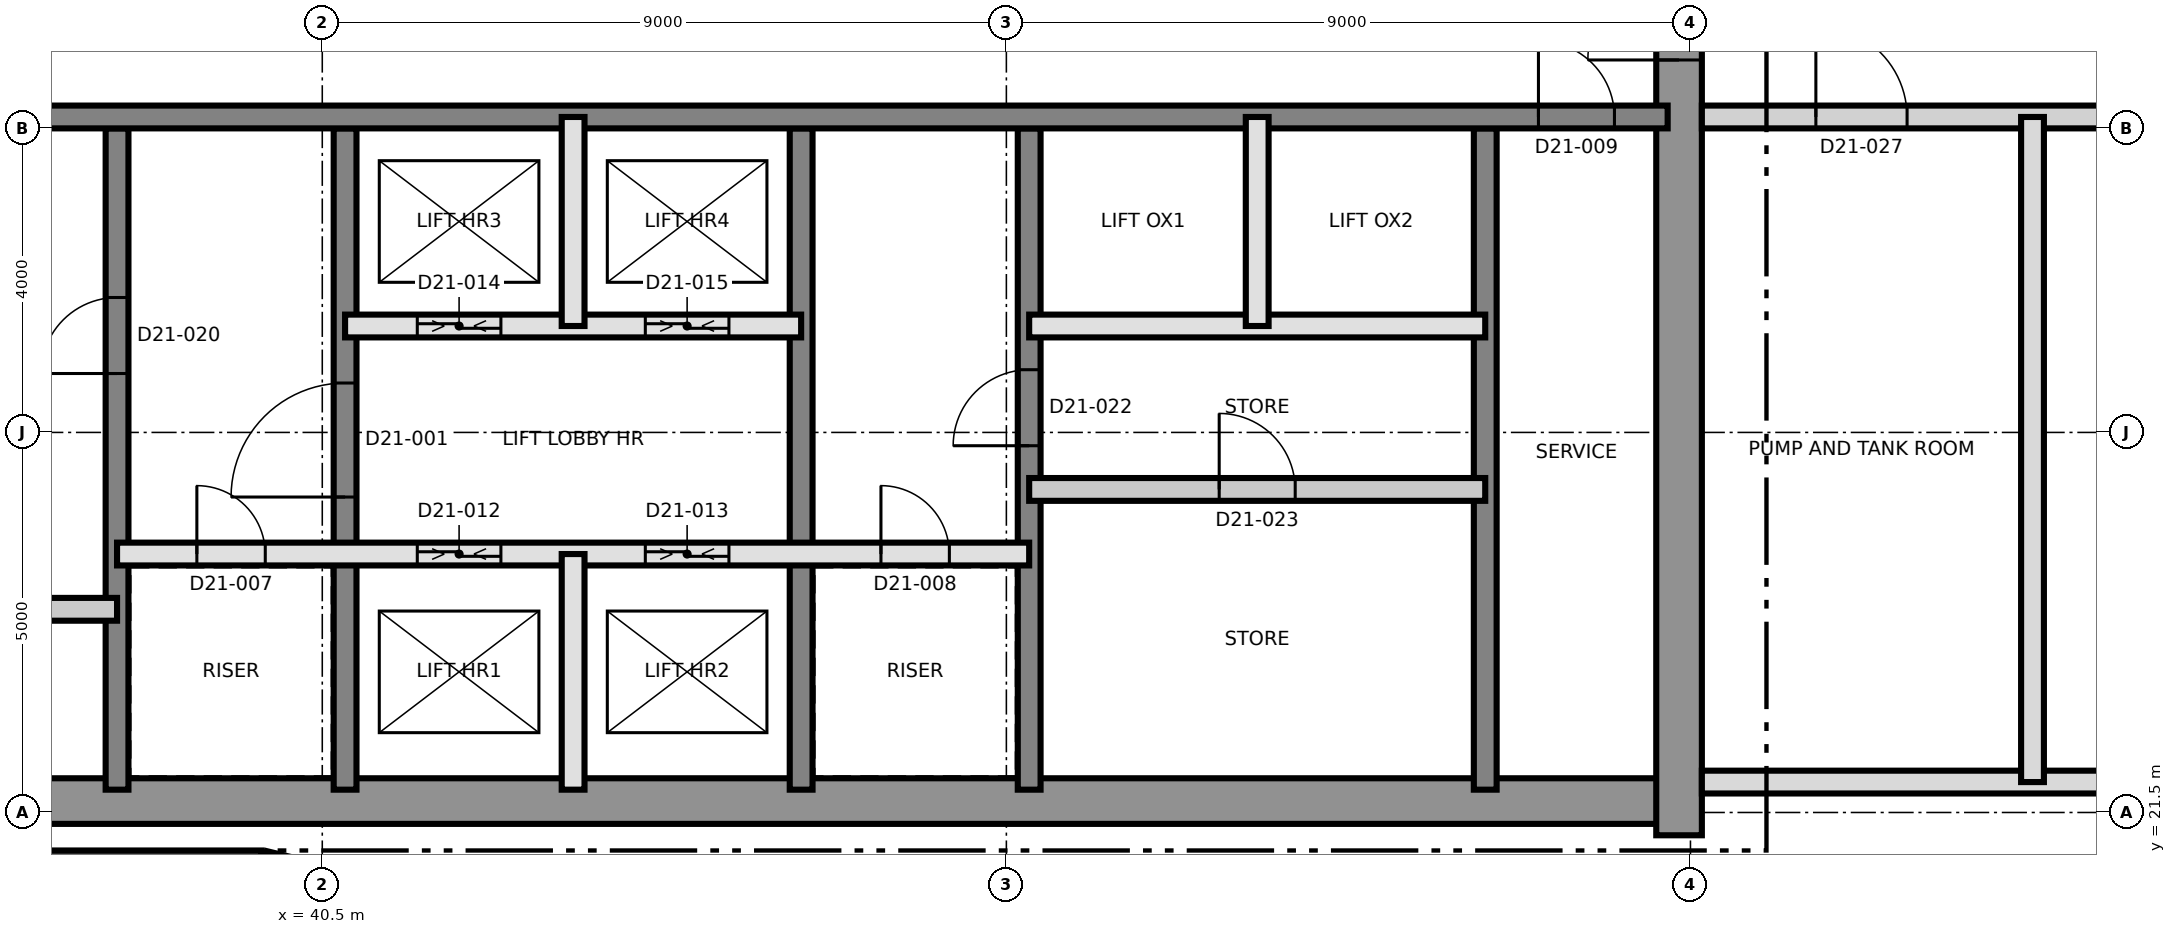
"""IFC4 building model, lengths in metres.
Left out: names, types, materials, properties, quantities, classifications, styles, units other than length and angle.
Written with IfcOpenShell. Run it as: python <this file> out.ifc"""

import sys

from ifc_helpers import new_model, si_unit, direction, frame, frame_2d, origin, place, context, subcontext, project, spatial, rectangle, extrude, element, fill, save


model = new_model("IFC4")
c1 = context("Model", 3, precision=1e-05, world=origin(), true_north=direction((0.0, 1.0)))
c2 = subcontext(c1, "Body", "Model", "MODEL_VIEW")
j1 = project(units=[si_unit("LENGTHUNIT", "METRE"), si_unit("PLANEANGLEUNIT", "RADIAN")], contexts=[c1])
p1 = place(None, origin())
s1 = spatial("IfcSite", under=j1, at=p1, CompositionType="ELEMENT")
p2 = place(p1, origin())
s2 = spatial("IfcBuilding", under=s1, at=p2, CompositionType="ELEMENT")
p3 = place(p2, frame((0.0, 0.0, 190.3)))
s3 = spatial("IfcBuildingStorey", under=s2, at=p3, CompositionType="ELEMENT", Elevation=190.3)
p4 = place(p3, frame((31.2, 21.65, 0.0), z_axis=(0.0, 0.0, 1.0), x_axis=(1.0, 0.0, 0.0)))
e1 = element("IfcWall", 1, at=p4, inside=s3, PredefinedType="SHEAR", context=c2, shape_type="SweptSolid", body=[
    extrude(rectangle(XDim=27.0, YDim=0.6, at=frame_2d((13.5, 0.0))), origin(), (0.0, 0.0, 1.0), 5.5),
])
p5 = place(p3, frame((58.35, 21.2, 0.0), z_axis=(0.0, 0.0, 1.0), x_axis=(0.0, 1.0, 0.0)))
e2 = element("IfcWall", 2, at=p5, inside=s3, PredefinedType="SHEAR", context=c2, shape_type="SweptSolid", body=[
    extrude(rectangle(XDim=18.6, YDim=0.6, at=frame_2d((9.3, 0.0))), origin(), (0.0, 0.0, 1.0), 5.5),
])
p6 = place(p5, frame((10.2, 0.0, 0.0)))
e3 = element("IfcOpeningElement", 3, at=p6, cuts=e2, PredefinedType="OPENING", context=c2, shape_type="SweptSolid", body=[
    extrude(rectangle(XDim=1.2, YDim=2.1, at=frame_2d((0.6, 1.05))), frame((0.0, 0.31, 0.0), z_axis=(0.0, -1.0, 0.0), x_axis=(1.0, 0.0, 0.0)), (0.0, 0.0, 1.0), 0.62),
])
p7 = place(p3, frame((37.8, 21.8, 0.0), z_axis=(0.0, 0.0, 1.0), x_axis=(0.0, 1.0, 0.0)))
e4 = element("IfcWall", 4, at=p7, inside=s3, PredefinedType="SHEAR", context=c2, shape_type="SweptSolid", body=[
    extrude(rectangle(XDim=8.7, YDim=0.3, at=frame_2d((4.35, 0.0))), origin(), (0.0, 0.0, 1.0), 5.5),
])
p8 = place(p7, frame((5.475, 0.0, 0.0)))
e5 = element("IfcOpeningElement", 5, at=p8, cuts=e4, PredefinedType="OPENING", context=c2, shape_type="SweptSolid", body=[
    extrude(rectangle(XDim=1.0, YDim=2.1, at=frame_2d((0.5, 1.05))), frame((0.0, 0.16, 0.0), z_axis=(0.0, -1.0, 0.0), x_axis=(1.0, 0.0, 0.0)), (0.0, 0.0, 1.0), 0.32),
])
p9 = place(p3, frame((40.8, 21.8, 0.0), z_axis=(0.0, 0.0, 1.0), x_axis=(0.0, 1.0, 0.0)))
e6 = element("IfcWall", 6, at=p9, inside=s3, PredefinedType="SHEAR", context=c2, shape_type="SweptSolid", body=[
    extrude(rectangle(XDim=8.7, YDim=0.3, at=frame_2d((4.35, 0.0))), origin(), (0.0, 0.0, 1.0), 5.5),
])
p10 = place(p9, frame((3.85, 0.0, 0.0)))
e7 = element("IfcOpeningElement", 7, at=p10, cuts=e6, PredefinedType="OPENING", context=c2, shape_type="SweptSolid", body=[
    extrude(rectangle(XDim=1.5, YDim=2.1, at=frame_2d((0.75, 1.05))), frame((0.0, 0.16, 0.0), z_axis=(0.0, -1.0, 0.0), x_axis=(1.0, 0.0, 0.0)), (0.0, 0.0, 1.0), 0.32),
])
p11 = place(p3, frame((46.8, 21.8, 0.0), z_axis=(0.0, 0.0, 1.0), x_axis=(0.0, 1.0, 0.0)))
e8 = element("IfcWall", 8, at=p11, inside=s3, PredefinedType="SHEAR", context=c2, shape_type="SweptSolid", body=[
    extrude(rectangle(XDim=8.7, YDim=0.3, at=frame_2d((4.35, 0.0))), origin(), (0.0, 0.0, 1.0), 5.5),
])
p12 = place(p3, frame((49.8, 21.8, 0.0), z_axis=(0.0, 0.0, 1.0), x_axis=(0.0, 1.0, 0.0)))
e9 = element("IfcWall", 9, at=p12, inside=s3, PredefinedType="SHEAR", context=c2, shape_type="SweptSolid", body=[
    extrude(rectangle(XDim=8.7, YDim=0.3, at=frame_2d((4.35, 0.0))), origin(), (0.0, 0.0, 1.0), 5.5),
])
p13 = place(p12, frame((4.525, 0.0, 0.0)))
e10 = element("IfcOpeningElement", 10, at=p13, cuts=e9, PredefinedType="OPENING", context=c2, shape_type="SweptSolid", body=[
    extrude(rectangle(XDim=1.0, YDim=2.1, at=frame_2d((0.5, 1.05))), frame((0.0, 0.16, 0.0), z_axis=(0.0, -1.0, 0.0), x_axis=(1.0, 0.0, 0.0)), (0.0, 0.0, 1.0), 0.32),
])
p14 = place(p3, frame((55.8, 21.8, 0.0), z_axis=(0.0, 0.0, 1.0), x_axis=(0.0, 1.0, 0.0)))
e11 = element("IfcWall", 11, at=p14, inside=s3, PredefinedType="SHEAR", context=c2, shape_type="SweptSolid", body=[
    extrude(rectangle(XDim=8.7, YDim=0.3, at=frame_2d((4.35, 0.0))), origin(), (0.0, 0.0, 1.0), 5.5),
])
p15 = place(p3, frame((31.8, 30.65, 0.0), z_axis=(0.0, 0.0, 1.0), x_axis=(1.0, 0.0, 0.0)))
e12 = element("IfcWall", 12, at=p15, inside=s3, PredefinedType="SHEAR", context=c2, shape_type="SweptSolid", body=[
    extrude(rectangle(XDim=26.4, YDim=0.3, at=frame_2d((13.2, 0.0))), origin(), (0.0, 0.0, 1.0), 5.5),
])
p16 = place(p15, frame((24.7, 0.0, 0.0)))
e13 = element("IfcOpeningElement", 13, at=p16, cuts=e12, PredefinedType="OPENING", context=c2, shape_type="SweptSolid", body=[
    extrude(rectangle(XDim=1.0, YDim=2.1, at=frame_2d((0.5, 1.05))), frame((0.0, 0.16, 0.0), z_axis=(0.0, -1.0, 0.0), x_axis=(1.0, 0.0, 0.0)), (0.0, 0.0, 1.0), 0.32),
])
p17 = place(p3, frame((31.36, 20.85, 0.0), z_axis=(0.0, 0.0, 1.0), x_axis=(1.0, 0.0, 0.0)))
e14 = element("IfcWall", 14, at=p17, inside=s3, PredefinedType="SOLIDWALL", context=c2, shape_type="SweptSolid", body=[
    extrude(rectangle(XDim=8.34, YDim=0.3, at=frame_2d((4.17, 0.0))), origin(), (0.0, 0.0, 1.0), 5.2),
])
p18 = place(p3, frame((39.735, 20.846, 0.0), z_axis=(0.0, 0.0, 1.0), x_axis=(0.97206095595, -0.234728562212, 0.0)))
e15 = element("IfcWall", 15, at=p18, inside=s3, PredefinedType="SOLIDWALL", context=c2, shape_type="SweptSolid", body=[
    extrude(rectangle(XDim=2.35, YDim=0.3, at=frame_2d((1.175, 0.0))), origin(), (0.0, 0.0, 1.0), 5.2),
])
p19 = place(p3, frame((31.8, 24.173, 0.0), z_axis=(0.0, 0.0, 1.0), x_axis=(1.0, 0.0, 0.0)))
e16 = element("IfcWall", 16, at=p19, inside=s3, PredefinedType="PARTITIONING", context=c2, shape_type="SweptSolid", body=[
    extrude(rectangle(XDim=6.0, YDim=0.3, at=frame_2d((3.0, 0.0))), origin(), (0.0, 0.0, 1.0), 5.2),
])
p20 = place(p19, frame((2.5, 0.0, 0.0)))
e17 = element("IfcOpeningElement", 17, at=p20, cuts=e16, PredefinedType="OPENING", context=c2, shape_type="SweptSolid", body=[
    extrude(rectangle(XDim=1.0, YDim=2.1, at=frame_2d((0.5, 1.05))), frame((0.0, 0.16, 0.0), z_axis=(0.0, -1.0, 0.0), x_axis=(1.0, 0.0, 0.0)), (0.0, 0.0, 1.0), 0.32),
])
p21 = place(p3, frame((37.8, 24.9, 0.0), z_axis=(0.0, 0.0, 1.0), x_axis=(1.0, 0.0, 0.0)))
e18 = element("IfcWall", 18, at=p21, inside=s3, PredefinedType="SOLIDWALL", context=c2, shape_type="SweptSolid", body=[
    extrude(rectangle(XDim=12.0, YDim=0.3, at=frame_2d((6.0, 0.0))), origin(), (0.0, 0.0, 1.0), 5.2),
])
p22 = place(p21, frame((1.05, 0.0, 0.0)))
e19 = element("IfcOpeningElement", 19, at=p22, cuts=e18, PredefinedType="OPENING", context=c2, shape_type="SweptSolid", body=[
    extrude(rectangle(XDim=0.9, YDim=2.1, at=frame_2d((0.45, 1.05))), frame((0.0, 0.16, 0.0), z_axis=(0.0, -1.0, 0.0), x_axis=(1.0, 0.0, 0.0)), (0.0, 0.0, 1.0), 0.32),
])
p23 = place(p21, frame((10.05, 0.0, 0.0)))
e20 = element("IfcOpeningElement", 20, at=p23, cuts=e18, PredefinedType="OPENING", context=c2, shape_type="SweptSolid", body=[
    extrude(rectangle(XDim=0.9, YDim=2.1, at=frame_2d((0.45, 1.05))), frame((0.0, 0.16, 0.0), z_axis=(0.0, -1.0, 0.0), x_axis=(1.0, 0.0, 0.0)), (0.0, 0.0, 1.0), 0.32),
])
p24 = place(p21, frame((3.95, 0.0, 0.0)))
e21 = element("IfcOpeningElement", 21, at=p24, cuts=e18, PredefinedType="OPENING", context=c2, shape_type="SweptSolid", body=[
    extrude(rectangle(XDim=1.1, YDim=2.4, at=frame_2d((0.55, 1.2))), frame((0.0, 0.16, 0.0), z_axis=(0.0, -1.0, 0.0), x_axis=(1.0, 0.0, 0.0)), (0.0, 0.0, 1.0), 0.32),
])
p25 = place(p21, frame((6.95, 0.0, 0.0)))
e22 = element("IfcOpeningElement", 22, at=p25, cuts=e18, PredefinedType="OPENING", context=c2, shape_type="SweptSolid", body=[
    extrude(rectangle(XDim=1.1, YDim=2.4, at=frame_2d((0.55, 1.2))), frame((0.0, 0.16, 0.0), z_axis=(0.0, -1.0, 0.0), x_axis=(1.0, 0.0, 0.0)), (0.0, 0.0, 1.0), 0.32),
])
p26 = place(p3, frame((49.8, 25.75, 0.0), z_axis=(0.0, 0.0, 1.0), x_axis=(1.0, 0.0, 0.0)))
e23 = element("IfcWall", 23, at=p26, inside=s3, PredefinedType="PARTITIONING", context=c2, shape_type="SweptSolid", body=[
    extrude(rectangle(XDim=6.0, YDim=0.3, at=frame_2d((3.0, 0.0))), origin(), (0.0, 0.0, 1.0), 5.2),
])
p27 = place(p26, frame((2.5, 0.0, 0.0)))
e24 = element("IfcOpeningElement", 24, at=p27, cuts=e23, PredefinedType="OPENING", context=c2, shape_type="SweptSolid", body=[
    extrude(rectangle(XDim=1.0, YDim=2.1, at=frame_2d((0.5, 1.05))), frame((0.0, 0.16, 0.0), z_axis=(0.0, -1.0, 0.0), x_axis=(1.0, 0.0, 0.0)), (0.0, 0.0, 1.0), 0.32),
])
p28 = place(p3, frame((40.8, 27.9, 0.0), z_axis=(0.0, 0.0, 1.0), x_axis=(1.0, 0.0, 0.0)))
e25 = element("IfcWall", 25, at=p28, inside=s3, PredefinedType="SOLIDWALL", context=c2, shape_type="SweptSolid", body=[
    extrude(rectangle(XDim=6.0, YDim=0.3, at=frame_2d((3.0, 0.0))), origin(), (0.0, 0.0, 1.0), 5.2),
])
p29 = place(p28, frame((0.95, 0.0, 0.0)))
e26 = element("IfcOpeningElement", 26, at=p29, cuts=e25, PredefinedType="OPENING", context=c2, shape_type="SweptSolid", body=[
    extrude(rectangle(XDim=1.1, YDim=2.4, at=frame_2d((0.55, 1.2))), frame((0.0, 0.16, 0.0), z_axis=(0.0, -1.0, 0.0), x_axis=(1.0, 0.0, 0.0)), (0.0, 0.0, 1.0), 0.32),
])
p30 = place(p28, frame((3.95, 0.0, 0.0)))
e27 = element("IfcOpeningElement", 27, at=p30, cuts=e25, PredefinedType="OPENING", context=c2, shape_type="SweptSolid", body=[
    extrude(rectangle(XDim=1.1, YDim=2.4, at=frame_2d((0.55, 1.2))), frame((0.0, 0.16, 0.0), z_axis=(0.0, -1.0, 0.0), x_axis=(1.0, 0.0, 0.0)), (0.0, 0.0, 1.0), 0.32),
])
p31 = place(p3, frame((49.8, 27.9, 0.0), z_axis=(0.0, 0.0, 1.0), x_axis=(1.0, 0.0, 0.0)))
e28 = element("IfcWall", 28, at=p31, inside=s3, PredefinedType="SOLIDWALL", context=c2, shape_type="SweptSolid", body=[
    extrude(rectangle(XDim=6.0, YDim=0.3, at=frame_2d((3.0, 0.0))), origin(), (0.0, 0.0, 1.0), 5.2),
])
p32 = place(p3, frame((43.8, 21.8, 0.0), z_axis=(0.0, 0.0, 1.0), x_axis=(0.0, 1.0, 0.0)))
e29 = element("IfcWall", 29, at=p32, inside=s3, PredefinedType="SOLIDWALL", context=c2, shape_type="SweptSolid", body=[
    extrude(rectangle(XDim=3.1, YDim=0.3, at=frame_2d((1.55, 0.0))), origin(), (0.0, 0.0, 1.0), 5.2),
])
for number, where, z_axis, x_axis in (
    (30, (43.8, 27.9, 0.0), (0.0, 0.0, 1.0), (0.0, 1.0, 0.0)),
    (31, (52.8, 27.9, 0.0), (0.0, 0.0, 1.0), (0.0, 1.0, 0.0)),
):
    element("IfcWall", number, at=place(p3, frame(where, z_axis=z_axis, x_axis=x_axis)), inside=s3, PredefinedType="SOLIDWALL", context=c2, shape_type="SweptSolid", body=[
        extrude(rectangle(XDim=2.75, YDim=0.3, at=frame_2d((1.375, 0.0))), origin(), (0.0, 0.0, 1.0), 5.2),
    ])
p33 = place(p3, frame((58.65, 21.9, 0.0), z_axis=(0.0, 0.0, 1.0), x_axis=(1.0, 0.0, 0.0)))
e32 = element("IfcWall", 32, at=p33, inside=s3, PredefinedType="PARTITIONING", context=c2, shape_type="SweptSolid", body=[
    extrude(rectangle(XDim=26.68, YDim=0.3, at=frame_2d((13.34, 0.0))), origin(), (0.0, 0.0, 1.0), 5.2),
])
p34 = place(p3, frame((58.65, 30.65, 0.0), z_axis=(0.0, 0.0, 1.0), x_axis=(1.0, 0.0, 0.0)))
e33 = element("IfcWall", 33, at=p34, inside=s3, PredefinedType="PARTITIONING", context=c2, shape_type="SweptSolid", body=[
    extrude(rectangle(XDim=26.68, YDim=0.3, at=frame_2d((13.34, 0.0))), origin(), (0.0, 0.0, 1.0), 5.2),
])
p35 = place(p34, frame((1.5, 0.0, 0.0)))
e34 = element("IfcOpeningElement", 34, at=p35, cuts=e33, PredefinedType="OPENING", context=c2, shape_type="SweptSolid", body=[
    extrude(rectangle(XDim=1.2, YDim=2.1, at=frame_2d((0.6, 1.05))), frame((0.0, 0.16, 0.0), z_axis=(0.0, -1.0, 0.0), x_axis=(1.0, 0.0, 0.0)), (0.0, 0.0, 1.0), 0.32),
])
p36 = place(p34, frame((6.0, 0.0, 0.0)))
e35 = element("IfcOpeningElement", 35, at=p36, cuts=e33, PredefinedType="OPENING", context=c2, shape_type="SweptSolid", body=[
    extrude(rectangle(XDim=1.2, YDim=2.1, at=frame_2d((0.6, 1.05))), frame((0.0, 0.16, 0.0), z_axis=(0.0, -1.0, 0.0), x_axis=(1.0, 0.0, 0.0)), (0.0, 0.0, 1.0), 0.32),
])
p37 = place(p34, frame((10.5, 0.0, 0.0)))
e36 = element("IfcOpeningElement", 36, at=p37, cuts=e33, PredefinedType="OPENING", context=c2, shape_type="SweptSolid", body=[
    extrude(rectangle(XDim=1.2, YDim=2.1, at=frame_2d((0.6, 1.05))), frame((0.0, 0.16, 0.0), z_axis=(0.0, -1.0, 0.0), x_axis=(1.0, 0.0, 0.0)), (0.0, 0.0, 1.0), 0.32),
])
p38 = place(p34, frame((15.0, 0.0, 0.0)))
e37 = element("IfcOpeningElement", 37, at=p38, cuts=e33, PredefinedType="OPENING", context=c2, shape_type="SweptSolid", body=[
    extrude(rectangle(XDim=1.2, YDim=2.1, at=frame_2d((0.6, 1.05))), frame((0.0, 0.16, 0.0), z_axis=(0.0, -1.0, 0.0), x_axis=(1.0, 0.0, 0.0)), (0.0, 0.0, 1.0), 0.32),
])
p39 = place(p34, frame((19.5, 0.0, 0.0)))
e38 = element("IfcOpeningElement", 38, at=p39, cuts=e33, PredefinedType="OPENING", context=c2, shape_type="SweptSolid", body=[
    extrude(rectangle(XDim=1.2, YDim=2.1, at=frame_2d((0.6, 1.05))), frame((0.0, 0.16, 0.0), z_axis=(0.0, -1.0, 0.0), x_axis=(1.0, 0.0, 0.0)), (0.0, 0.0, 1.0), 0.32),
])
p40 = place(p34, frame((24.0, 0.0, 0.0)))
e39 = element("IfcOpeningElement", 39, at=p40, cuts=e33, PredefinedType="OPENING", context=c2, shape_type="SweptSolid", body=[
    extrude(rectangle(XDim=1.2, YDim=2.1, at=frame_2d((0.6, 1.05))), frame((0.0, 0.16, 0.0), z_axis=(0.0, -1.0, 0.0), x_axis=(1.0, 0.0, 0.0)), (0.0, 0.0, 1.0), 0.32),
])
p41 = place(p3, frame((63.0, 21.9, 0.0), z_axis=(0.0, 0.0, 1.0), x_axis=(0.0, 1.0, 0.0)))
e40 = element("IfcWall", 40, at=p41, inside=s3, PredefinedType="PARTITIONING", context=c2, shape_type="SweptSolid", body=[
    extrude(rectangle(XDim=8.75, YDim=0.3, at=frame_2d((4.375, 0.0))), origin(), (0.0, 0.0, 1.0), 5.2),
])
p42 = place(p10, origin())
e41 = element("IfcDoor", 41, at=p42, inside=s3, OperationType="SINGLE_SWING_RIGHT", PredefinedType="DOOR", context=c2, shape_type="SweptSolid", body=[
    extrude(rectangle(XDim=1.5, YDim=2.1, at=frame_2d((0.75, 1.05))), frame((0.0, 0.025, 0.0), z_axis=(0.0, -1.0, 0.0), x_axis=(1.0, 0.0, 0.0)), (0.0, 0.0, 1.0), 0.05),
])
fill(e7, e41)
p43 = place(p22, origin())
e42 = element("IfcDoor", 42, at=p43, inside=s3, OperationType="SINGLE_SWING_LEFT", PredefinedType="DOOR", context=c2, shape_type="SweptSolid", body=[
    extrude(rectangle(XDim=0.9, YDim=2.1, at=frame_2d((0.45, 1.05))), frame((0.0, 0.025, 0.0), z_axis=(0.0, -1.0, 0.0), x_axis=(1.0, 0.0, 0.0)), (0.0, 0.0, 1.0), 0.05),
])
fill(e19, e42)
p44 = place(p23, origin())
e43 = element("IfcDoor", 43, at=p44, inside=s3, OperationType="SINGLE_SWING_RIGHT", PredefinedType="DOOR", context=c2, shape_type="SweptSolid", body=[
    extrude(rectangle(XDim=0.9, YDim=2.1, at=frame_2d((0.45, 1.05))), frame((0.0, 0.025, 0.0), z_axis=(0.0, -1.0, 0.0), x_axis=(1.0, 0.0, 0.0)), (0.0, 0.0, 1.0), 0.05),
])
fill(e20, e43)
p45 = place(p16, origin())
e44 = element("IfcDoor", 44, at=p45, inside=s3, OperationType="SINGLE_SWING_LEFT", PredefinedType="DOOR", context=c2, shape_type="SweptSolid", body=[
    extrude(rectangle(XDim=1.0, YDim=2.1, at=frame_2d((0.5, 1.05))), frame((0.0, 0.025, 0.0), z_axis=(0.0, -1.0, 0.0), x_axis=(1.0, 0.0, 0.0)), (0.0, 0.0, 1.0), 0.05),
])
fill(e13, e44)
p46 = place(p6, origin())
e45 = element("IfcDoor", 45, at=p46, inside=s3, OperationType="SINGLE_SWING_LEFT", PredefinedType="DOOR", context=c2, shape_type="SweptSolid", body=[
    extrude(rectangle(XDim=1.2, YDim=2.1, at=frame_2d((0.6, 1.05))), frame((0.0, 0.025, 0.0), z_axis=(0.0, -1.0, 0.0), x_axis=(1.0, 0.0, 0.0)), (0.0, 0.0, 1.0), 0.05),
])
fill(e3, e45)
p47 = place(p24, origin())
e46 = element("IfcDoor", 46, at=p47, inside=s3, OperationType="SLIDING_TO_LEFT", PredefinedType="DOOR", context=c2, shape_type="SweptSolid", body=[
    extrude(rectangle(XDim=1.1, YDim=2.4, at=frame_2d((0.55, 1.2))), frame((0.0, 0.025, 0.0), z_axis=(0.0, -1.0, 0.0), x_axis=(1.0, 0.0, 0.0)), (0.0, 0.0, 1.0), 0.05),
])
fill(e21, e46)
p48 = place(p25, origin())
e47 = element("IfcDoor", 47, at=p48, inside=s3, OperationType="SLIDING_TO_LEFT", PredefinedType="DOOR", context=c2, shape_type="SweptSolid", body=[
    extrude(rectangle(XDim=1.1, YDim=2.4, at=frame_2d((0.55, 1.2))), frame((0.0, 0.025, 0.0), z_axis=(0.0, -1.0, 0.0), x_axis=(1.0, 0.0, 0.0)), (0.0, 0.0, 1.0), 0.05),
])
fill(e22, e47)
p49 = place(p29, origin())
e48 = element("IfcDoor", 48, at=p49, inside=s3, OperationType="SLIDING_TO_LEFT", PredefinedType="DOOR", context=c2, shape_type="SweptSolid", body=[
    extrude(rectangle(XDim=1.1, YDim=2.4, at=frame_2d((0.55, 1.2))), frame((0.0, 0.025, 0.0), z_axis=(0.0, -1.0, 0.0), x_axis=(1.0, 0.0, 0.0)), (0.0, 0.0, 1.0), 0.05),
])
fill(e26, e48)
p50 = place(p30, origin())
e49 = element("IfcDoor", 49, at=p50, inside=s3, OperationType="SLIDING_TO_LEFT", PredefinedType="DOOR", context=c2, shape_type="SweptSolid", body=[
    extrude(rectangle(XDim=1.1, YDim=2.4, at=frame_2d((0.55, 1.2))), frame((0.0, 0.025, 0.0), z_axis=(0.0, -1.0, 0.0), x_axis=(1.0, 0.0, 0.0)), (0.0, 0.0, 1.0), 0.05),
])
fill(e27, e49)
p51 = place(p8, origin())
e50 = element("IfcDoor", 50, at=p51, inside=s3, OperationType="SINGLE_SWING_LEFT", PredefinedType="DOOR", context=c2, shape_type="SweptSolid", body=[
    extrude(rectangle(XDim=1.0, YDim=2.1, at=frame_2d((0.5, 1.05))), frame((0.0, 0.025, 0.0), z_axis=(0.0, -1.0, 0.0), x_axis=(1.0, 0.0, 0.0)), (0.0, 0.0, 1.0), 0.05),
])
fill(e5, e50)
p52 = place(p13, origin())
e51 = element("IfcDoor", 51, at=p52, inside=s3, OperationType="SINGLE_SWING_LEFT", PredefinedType="DOOR", context=c2, shape_type="SweptSolid", body=[
    extrude(rectangle(XDim=1.0, YDim=2.1, at=frame_2d((0.5, 1.05))), frame((0.0, 0.025, 0.0), z_axis=(0.0, -1.0, 0.0), x_axis=(1.0, 0.0, 0.0)), (0.0, 0.0, 1.0), 0.05),
])
fill(e10, e51)
p53 = place(p27, origin())
e52 = element("IfcDoor", 52, at=p53, inside=s3, OperationType="SINGLE_SWING_RIGHT", PredefinedType="DOOR", context=c2, shape_type="SweptSolid", body=[
    extrude(rectangle(XDim=1.0, YDim=2.1, at=frame_2d((0.5, 1.05))), frame((0.0, 0.025, 0.0), z_axis=(0.0, -1.0, 0.0), x_axis=(1.0, 0.0, 0.0)), (0.0, 0.0, 1.0), 0.05),
])
fill(e24, e52)
p54 = place(p35, origin())
e53 = element("IfcDoor", 53, at=p54, inside=s3, OperationType="SINGLE_SWING_RIGHT", PredefinedType="DOOR", context=c2, shape_type="SweptSolid", body=[
    extrude(rectangle(XDim=1.2, YDim=2.1, at=frame_2d((0.6, 1.05))), frame((0.0, 0.025, 0.0), z_axis=(0.0, -1.0, 0.0), x_axis=(1.0, 0.0, 0.0)), (0.0, 0.0, 1.0), 0.05),
])
fill(e34, e53)
save(model, sys.argv[1])
